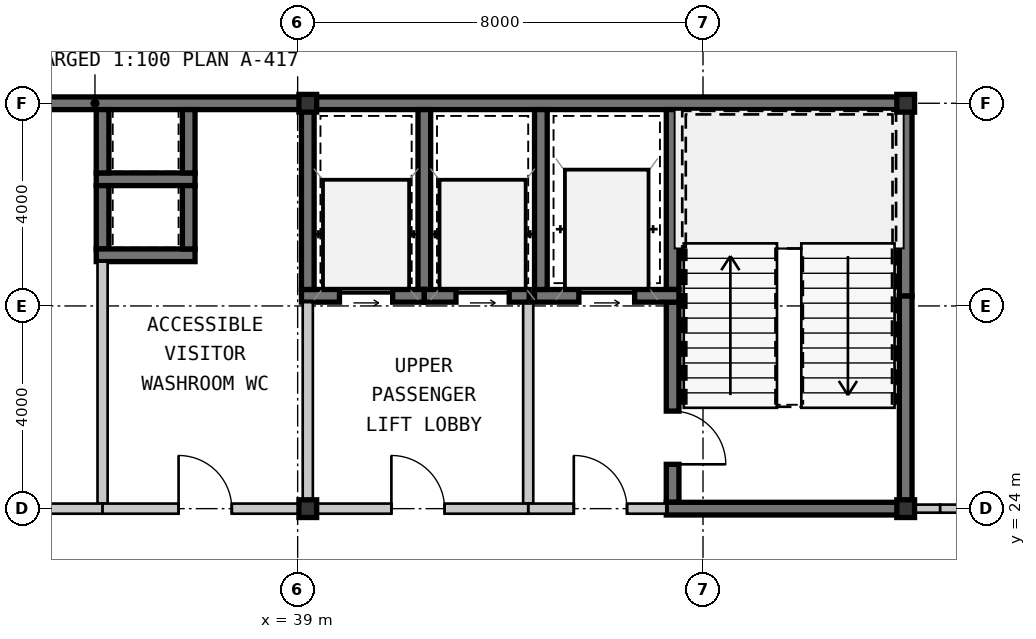
"""IFC4 building model, lengths in metres.
Left out: names, types, materials, properties, quantities, classifications, styles, units other than length and angle.
Written with IfcOpenShell. Run it as: python <this file> out.ifc"""

import sys

from ifc_helpers import new_model, si_unit, direction, frame, frame_2d, origin, origin_2d, place, context, subcontext, project, spatial, rectangle, hollow_rectangle, extrude, source, transform, mapped, element, fill, save


model = new_model("IFC4")
c1 = context("Model", 3, precision=1e-05, world=origin(), true_north=direction((0.0, 1.0)))
c2 = subcontext(c1, "Body", "Model", "MODEL_VIEW")
j1 = project(units=[si_unit("LENGTHUNIT", "METRE"), si_unit("PLANEANGLEUNIT", "RADIAN")], contexts=[c1])
p1 = place(None, origin())
s1 = spatial("IfcSite", under=j1, at=p1, CompositionType="ELEMENT")
p2 = place(p1, origin())
s2 = spatial("IfcBuilding", under=s1, at=p2, CompositionType="ELEMENT")
p3 = place(p2, frame((0.0, 0.0, 168.7)))
s3 = spatial("IfcBuildingStorey", under=s2, at=p3, CompositionType="ELEMENT", Elevation=168.7)
m1 = source(origin(), c2, "Body", "SweptSolid", [
    extrude(hollow_rectangle(XDim=0.35, YDim=0.35, WallThickness=0.016, at=origin_2d()), origin(), (0.0, 0.0, 1.0), 3.85),
])
for number, where, z_axis, x_axis in (
    (1, (39.2, 24.0, 0.0), (0.0, 0.0, 1.0), (1.0, 0.0, 0.0)),
    (2, (51.0, 24.0, 0.0), (0.0, 0.0, 1.0), (1.0, 0.0, 0.0)),
    (3, (39.2, 32.0, 0.0), (0.0, 0.0, 1.0), (1.0, 0.0, 0.0)),
    (4, (51.0, 32.0, 0.0), (0.0, 0.0, 1.0), (1.0, 0.0, 0.0)),
):
    element("IfcColumn", number, at=place(p3, frame(where, z_axis=z_axis, x_axis=x_axis)), inside=s3, PredefinedType="COLUMN", context=c2, shape_type="MappedRepresentation", body=[
        mapped(m1, transform((0.0, 0.0, 0.0), scale=1.0)),
    ])
m2 = source(origin(), c2, "Body", "SweptSolid", [
    extrude(rectangle(XDim=11.2, YDim=0.25, at=frame_2d((5.6, 0.0))), origin(), (0.0, 0.0, 1.0), 3.63),
])
p4 = place(p3, frame((28.0, 32.0, 0.0), z_axis=(0.0, 0.0, 1.0), x_axis=(1.0, 0.0, 0.0)))
e5 = element("IfcWall", 5, at=p4, inside=s3, PredefinedType="SHEAR", context=c2, shape_type="MappedRepresentation", body=[
    mapped(m2, transform((0.0, 0.0, 0.0), scale=1.0)),
])
m3 = source(origin(), c2, "Body", "SweptSolid", [
    extrude(rectangle(XDim=11.925, YDim=0.25, at=frame_2d((5.962, 0.0))), origin(), (0.0, 0.0, 1.0), 3.63),
])
p5 = place(p3, frame((39.2, 32.0, 0.0), z_axis=(0.0, 0.0, 1.0), x_axis=(1.0, 0.0, 0.0)))
e6 = element("IfcWall", 6, at=p5, inside=s3, PredefinedType="SHEAR", context=c2, shape_type="MappedRepresentation", body=[
    mapped(m3, transform((0.0, 0.0, 0.0), scale=1.0)),
])
m4 = source(origin(), c2, "Body", "SweptSolid", [
    extrude(rectangle(XDim=4.075, YDim=0.25, at=frame_2d((2.038, 0.0))), origin(), (0.0, 0.0, 1.0), 3.63),
])
p6 = place(p3, frame((51.0, 24.125, 0.0), z_axis=(0.0, 0.0, 1.0), x_axis=(0.0, 1.0, 0.0)))
e7 = element("IfcWall", 7, at=p6, inside=s3, PredefinedType="SHEAR", context=c2, shape_type="MappedRepresentation", body=[
    mapped(m4, transform((0.0, 0.0, 0.0), scale=1.0)),
])
m5 = source(origin(), c2, "Body", "SweptSolid", [
    extrude(rectangle(XDim=3.675, YDim=0.25, at=frame_2d((1.837, 0.0))), origin(), (0.0, 0.0, 1.0), 3.63),
])
p7 = place(p3, frame((51.0, 28.2, 0.0), z_axis=(0.0, 0.0, 1.0), x_axis=(0.0, 1.0, 0.0)))
e8 = element("IfcWall", 8, at=p7, inside=s3, PredefinedType="SHEAR", context=c2, shape_type="MappedRepresentation", body=[
    mapped(m5, transform((0.0, 0.0, 0.0), scale=1.0)),
])
m6 = source(origin(), c2, "Body", "SweptSolid", [
    extrude(rectangle(XDim=3.55, YDim=0.25, at=frame_2d((1.775, 0.0))), origin(), (0.0, 0.0, 1.0), 3.63),
])
p8 = place(p3, frame((46.4, 31.875, 0.0), z_axis=(0.0, 0.0, 1.0), x_axis=(0.0, -1.0, 0.0)))
e9 = element("IfcWall", 9, at=p8, inside=s3, PredefinedType="SHEAR", context=c2, shape_type="MappedRepresentation", body=[
    mapped(m6, transform((0.0, 0.0, 0.0), scale=1.0)),
])
m7 = source(origin(), c2, "Body", "SweptSolid", [
    extrude(rectangle(XDim=3.95, YDim=0.25, at=frame_2d((1.975, 0.0))), origin(), (0.0, 0.0, 1.0), 3.63),
])
p9 = place(p3, frame((46.4, 28.075, 0.0), z_axis=(0.0, 0.0, 1.0), x_axis=(0.0, -1.0, 0.0)))
e10 = element("IfcWall", 10, at=p9, inside=s3, PredefinedType="SHEAR", context=c2, shape_type="MappedRepresentation", body=[
    mapped(m7, transform((0.0, 0.0, 0.0), scale=1.0)),
])
m8 = source(origin(), c2, "Body", "SweptSolid", [
    extrude(rectangle(XDim=1.05, YDim=2.1, at=frame_2d((0.525, 1.05))), frame((0.0, 0.135, 0.0), z_axis=(0.0, -1.0, 0.0), x_axis=(1.0, 0.0, 0.0)), (0.0, 0.0, 1.0), 0.27),
])
p10 = place(p9, frame((2.15, 0.0, 0.0)))
e11 = element("IfcOpeningElement", 11, at=p10, cuts=e10, PredefinedType="OPENING", context=c2, shape_type="MappedRepresentation", body=[
    mapped(m8, transform((0.0, 0.0, 0.0), scale=1.0)),
])
m9 = source(origin(), c2, "Body", "SweptSolid", [
    extrude(rectangle(XDim=4.85, YDim=0.25, at=frame_2d((2.425, 0.0))), origin(), (0.0, 0.0, 1.0), 3.63),
])
p11 = place(p3, frame((46.275, 24.0, 0.0), z_axis=(0.0, 0.0, 1.0), x_axis=(1.0, 0.0, 0.0)))
e12 = element("IfcWall", 12, at=p11, inside=s3, PredefinedType="SHEAR", context=c2, shape_type="MappedRepresentation", body=[
    mapped(m9, transform((0.0, 0.0, 0.0), scale=1.0)),
])
m10 = source(origin(), c2, "Body", "SweptSolid", [
    extrude(rectangle(XDim=2.85, YDim=0.25, at=frame_2d((1.425, 0.0))), origin(), (0.0, 0.0, 1.0), 3.63),
])
p12 = place(p3, frame((43.675, 28.2, 0.0), z_axis=(0.0, 0.0, 1.0), x_axis=(1.0, 0.0, 0.0)))
e13 = element("IfcWall", 13, at=p12, inside=s3, PredefinedType="SHEAR", context=c2, shape_type="MappedRepresentation", body=[
    mapped(m10, transform((0.0, 0.0, 0.0), scale=1.0)),
])
m11 = source(origin(), c2, "Body", "SweptSolid", [
    extrude(rectangle(XDim=1.1, YDim=2.15, at=frame_2d((0.55, 1.075))), frame((0.0, 0.135, 0.0), z_axis=(0.0, -1.0, 0.0), x_axis=(1.0, 0.0, 0.0)), (0.0, 0.0, 1.0), 0.27),
])
p13 = place(p12, frame((0.875, 0.0, 0.0)))
e14 = element("IfcOpeningElement", 14, at=p13, cuts=e13, PredefinedType="OPENING", context=c2, shape_type="MappedRepresentation", body=[
    mapped(m11, transform((0.0, 0.0, 0.0), scale=1.0)),
])
p14 = place(p3, frame((43.8, 31.875, 0.0), z_axis=(0.0, 0.0, 1.0), x_axis=(0.0, -1.0, 0.0)))
e15 = element("IfcWall", 15, at=p14, inside=s3, PredefinedType="SHEAR", context=c2, shape_type="MappedRepresentation", body=[
    mapped(m6, transform((0.0, 0.0, 0.0), scale=1.0)),
])
m12 = source(origin(), c2, "Body", "SweptSolid", [
    extrude(rectangle(XDim=3.975, YDim=0.2, at=frame_2d((1.987, 0.0))), origin(), (0.0, 0.0, 1.0), 3.63),
])
p15 = place(p3, frame((43.55, 28.075, 0.0), z_axis=(0.0, 0.0, 1.0), x_axis=(0.0, -1.0, 0.0)))
e16 = element("IfcWall", 16, at=p15, inside=s3, PredefinedType="SOLIDWALL", context=c2, shape_type="MappedRepresentation", body=[
    mapped(m12, transform((0.0, 0.0, 0.0), scale=1.0)),
])
m13 = source(origin(), c2, "Body", "SweptSolid", [
    extrude(rectangle(XDim=2.725, YDim=0.2, at=frame_2d((1.362, 0.0))), origin(), (0.0, 0.0, 1.0), 3.097),
])
p16 = place(p3, frame((43.55, 24.0, 0.0), z_axis=(0.0, 0.0, 1.0), x_axis=(1.0, 0.0, 0.0)))
e17 = element("IfcWall", 17, at=p16, inside=s3, PredefinedType="SOLIDWALL", context=c2, shape_type="MappedRepresentation", body=[
    mapped(m13, transform((0.0, 0.0, 0.0), scale=1.0)),
])
m14 = source(origin(), c2, "Body", "SweptSolid", [
    extrude(rectangle(XDim=1.05, YDim=2.1, at=frame_2d((0.525, 1.05))), frame((0.0, 0.11, 0.0), z_axis=(0.0, -1.0, 0.0), x_axis=(1.0, 0.0, 0.0)), (0.0, 0.0, 1.0), 0.22),
])
p17 = place(p16, frame((0.9, 0.0, 0.0)))
e18 = element("IfcOpeningElement", 18, at=p17, cuts=e17, PredefinedType="OPENING", context=c2, shape_type="MappedRepresentation", body=[
    mapped(m14, transform((0.0, 0.0, 0.0), scale=1.0)),
])
m15 = source(origin(), c2, "Body", "SweptSolid", [
    extrude(rectangle(XDim=1.95, YDim=0.25, at=frame_2d((0.975, 0.0))), origin(), (0.0, 0.0, 1.0), 3.63),
])
p18 = place(p3, frame((35.025, 30.5, 0.0), z_axis=(0.0, 0.0, 1.0), x_axis=(1.0, 0.0, 0.0)))
e19 = element("IfcWall", 19, at=p18, inside=s3, PredefinedType="SHEAR", context=c2, shape_type="MappedRepresentation", body=[
    mapped(m15, transform((0.0, 0.0, 0.0), scale=1.0)),
])
m16 = source(origin(), c2, "Body", "SweptSolid", [
    extrude(rectangle(XDim=1.25, YDim=0.25, at=frame_2d((0.625, 0.0))), origin(), (0.0, 0.0, 1.0), 3.63),
])
for number, where, z_axis, x_axis in (
    (20, (35.15, 31.875, 0.0), (0.0, 0.0, 1.0), (0.0, -1.0, 0.0)),
    (21, (36.85, 30.625, 0.0), (0.0, 0.0, 1.0), (0.0, 1.0, 0.0)),
    (22, (35.15, 30.375, 0.0), (0.0, 0.0, 1.0), (0.0, -1.0, 0.0)),
):
    element("IfcWall", number, at=place(p3, frame(where, z_axis=z_axis, x_axis=x_axis)), inside=s3, PredefinedType="SHEAR", context=c2, shape_type="MappedRepresentation", body=[
        mapped(m16, transform((0.0, 0.0, 0.0), scale=1.0)),
    ])
p19 = place(p3, frame((35.025, 29.0, 0.0), z_axis=(0.0, 0.0, 1.0), x_axis=(1.0, 0.0, 0.0)))
e23 = element("IfcWall", 23, at=p19, inside=s3, PredefinedType="SHEAR", context=c2, shape_type="MappedRepresentation", body=[
    mapped(m15, transform((0.0, 0.0, 0.0), scale=1.0)),
])
p20 = place(p3, frame((36.85, 29.125, 0.0), z_axis=(0.0, 0.0, 1.0), x_axis=(0.0, 1.0, 0.0)))
e24 = element("IfcWall", 24, at=p20, inside=s3, PredefinedType="SHEAR", context=c2, shape_type="MappedRepresentation", body=[
    mapped(m16, transform((0.0, 0.0, 0.0), scale=1.0)),
])
p21 = place(p3, frame((41.5, 28.325, 0.0), z_axis=(0.0, 0.0, 1.0), x_axis=(0.0, 1.0, 0.0)))
e25 = element("IfcWall", 25, at=p21, inside=s3, PredefinedType="SHEAR", context=c2, shape_type="MappedRepresentation", body=[
    mapped(m6, transform((0.0, 0.0, 0.0), scale=1.0)),
])
m17 = source(origin(), c2, "Body", "SweptSolid", [
    extrude(rectangle(XDim=2.425, YDim=0.25, at=frame_2d((1.212, 0.0))), origin(), (0.0, 0.0, 1.0), 3.63),
])
p22 = place(p3, frame((39.075, 28.2, 0.0), z_axis=(0.0, 0.0, 1.0), x_axis=(1.0, 0.0, 0.0)))
e26 = element("IfcWall", 26, at=p22, inside=s3, PredefinedType="SHEAR", context=c2, shape_type="MappedRepresentation", body=[
    mapped(m17, transform((0.0, 0.0, 0.0), scale=1.0)),
])
m18 = source(origin(), c2, "Body", "SweptSolid", [
    extrude(rectangle(XDim=1.05, YDim=2.15, at=frame_2d((0.525, 1.075))), frame((0.0, 0.135, 0.0), z_axis=(0.0, -1.0, 0.0), x_axis=(1.0, 0.0, 0.0)), (0.0, 0.0, 1.0), 0.27),
])
p23 = place(p22, frame((0.75, 0.0, 0.0)))
e27 = element("IfcOpeningElement", 27, at=p23, cuts=e26, PredefinedType="OPENING", context=c2, shape_type="MappedRepresentation", body=[
    mapped(m18, transform((0.0, 0.0, 0.0), scale=1.0)),
])
p24 = place(p3, frame((39.2, 31.875, 0.0), z_axis=(0.0, 0.0, 1.0), x_axis=(0.0, -1.0, 0.0)))
e28 = element("IfcWall", 28, at=p24, inside=s3, PredefinedType="SHEAR", context=c2, shape_type="MappedRepresentation", body=[
    mapped(m6, transform((0.0, 0.0, 0.0), scale=1.0)),
])
m19 = source(origin(), c2, "Body", "SweptSolid", [
    extrude(rectangle(XDim=2.07, YDim=0.25, at=frame_2d((1.035, 0.0))), origin(), (0.0, 0.0, 1.0), 3.63),
])
p25 = place(p3, frame((41.5, 28.2, 0.0), z_axis=(0.0, 0.0, 1.0), x_axis=(1.0, 0.0, 0.0)))
e29 = element("IfcWall", 29, at=p25, inside=s3, PredefinedType="SHEAR", context=c2, shape_type="MappedRepresentation", body=[
    mapped(m19, transform((0.0, 0.0, 0.0), scale=1.0)),
])
p26 = place(p25, frame((0.625, 0.0, 0.0)))
e30 = element("IfcOpeningElement", 30, at=p26, cuts=e29, PredefinedType="OPENING", context=c2, shape_type="MappedRepresentation", body=[
    mapped(m18, transform((0.0, 0.0, 0.0), scale=1.0)),
])
m20 = source(origin(), c2, "Body", "SweptSolid", [
    extrude(rectangle(XDim=3.975, YDim=0.2, at=frame_2d((1.987, 0.0))), origin(), (0.0, 0.0, 1.0), 3.17),
])
p27 = place(p3, frame((39.2, 24.1, 0.0), z_axis=(0.0, 0.0, 1.0), x_axis=(0.0, 1.0, 0.0)))
e31 = element("IfcWall", 31, at=p27, inside=s3, PredefinedType="SOLIDWALL", context=c2, shape_type="MappedRepresentation", body=[
    mapped(m20, transform((0.0, 0.0, 0.0), scale=1.0)),
])
m21 = source(origin(), c2, "Body", "SweptSolid", [
    extrude(rectangle(XDim=4.35, YDim=0.2, at=frame_2d((2.175, 0.0))), origin(), (0.0, 0.0, 1.0), 3.097),
])
p28 = place(p3, frame((43.55, 24.0, 0.0), z_axis=(0.0, 0.0, 1.0), x_axis=(-1.0, 0.0, 0.0)))
e32 = element("IfcWall", 32, at=p28, inside=s3, PredefinedType="SOLIDWALL", context=c2, shape_type="MappedRepresentation", body=[
    mapped(m21, transform((0.0, 0.0, 0.0), scale=1.0)),
])
p29 = place(p28, frame((1.65, 0.0, 0.0)))
e33 = element("IfcOpeningElement", 33, at=p29, cuts=e32, PredefinedType="OPENING", context=c2, shape_type="MappedRepresentation", body=[
    mapped(m14, transform((0.0, 0.0, 0.0), scale=1.0)),
])
m22 = source(origin(), c2, "Body", "SweptSolid", [
    extrude(rectangle(XDim=4.775, YDim=0.2, at=frame_2d((2.387, 0.0))), origin(), (0.0, 0.0, 1.0), 3.63),
])
p30 = place(p3, frame((35.15, 28.875, 0.0), z_axis=(0.0, 0.0, 1.0), x_axis=(0.0, -1.0, 0.0)))
e34 = element("IfcWall", 34, at=p30, inside=s3, PredefinedType="SOLIDWALL", context=c2, shape_type="MappedRepresentation", body=[
    mapped(m22, transform((0.0, 0.0, 0.0), scale=1.0)),
])
m23 = source(origin(), c2, "Body", "SweptSolid", [
    extrude(rectangle(XDim=8.7, YDim=0.2, at=frame_2d((4.35, 0.0))), origin(), (0.0, 0.0, 1.0), 3.17),
])
p31 = place(p3, frame((35.15, 24.0, 0.0), z_axis=(0.0, 0.0, 1.0), x_axis=(-1.0, 0.0, 0.0)))
e35 = element("IfcWall", 35, at=p31, inside=s3, PredefinedType="SOLIDWALL", context=c2, shape_type="MappedRepresentation", body=[
    mapped(m23, transform((0.0, 0.0, 0.0), scale=1.0)),
])
p32 = place(p31, frame((3.825, 0.0, 0.0)))
e36 = element("IfcOpeningElement", 36, at=p32, cuts=e35, PredefinedType="OPENING", context=c2, shape_type="MappedRepresentation", body=[
    mapped(m14, transform((0.0, 0.0, 0.0), scale=1.0)),
])
m24 = source(origin(), c2, "Body", "SweptSolid", [
    extrude(rectangle(XDim=4.05, YDim=0.2, at=frame_2d((2.025, 0.0))), origin(), (0.0, 0.0, 1.0), 3.17),
])
p33 = place(p3, frame((39.2, 24.0, 0.0), z_axis=(0.0, 0.0, 1.0), x_axis=(-1.0, 0.0, 0.0)))
e37 = element("IfcWall", 37, at=p33, inside=s3, PredefinedType="SOLIDWALL", context=c2, shape_type="MappedRepresentation", body=[
    mapped(m24, transform((0.0, 0.0, 0.0), scale=1.0)),
])
p34 = place(p33, frame((1.5, 0.0, 0.0)))
e38 = element("IfcOpeningElement", 38, at=p34, cuts=e37, PredefinedType="OPENING", context=c2, shape_type="MappedRepresentation", body=[
    mapped(m14, transform((0.0, 0.0, 0.0), scale=1.0)),
])
m25 = source(origin(), c2, "Body", "SweptSolid", [
    extrude(rectangle(XDim=0.556, YDim=0.16, at=frame_2d((0.278, 0.0))), origin(), (0.0, 0.0, 1.0), 3.17),
])
p35 = place(p3, frame((51.125, 24.0, 0.0), z_axis=(0.0, 0.0, 1.0), x_axis=(1.0, 0.0, 0.0)))
e39 = element("IfcWall", 39, at=p35, inside=s3, PredefinedType="PARTITIONING", context=c2, shape_type="MappedRepresentation", body=[
    mapped(m25, transform((0.0, 0.0, 0.0), scale=1.0)),
])
m26 = source(origin(), c2, "Body", "SweptSolid", [
    extrude(rectangle(XDim=9.153, YDim=0.16, at=frame_2d((4.576, 0.0))), origin(), (0.0, 0.0, 1.0), 3.63),
])
p36 = place(p3, frame((51.681, 24.0, 0.0), z_axis=(0.0, 0.0, 1.0), x_axis=(1.0, 0.0, 0.0)))
e40 = element("IfcWall", 40, at=p36, inside=s3, PredefinedType="PARTITIONING", context=c2, shape_type="MappedRepresentation", body=[
    mapped(m26, transform((0.0, 0.0, 0.0), scale=1.0)),
])
m27 = source(origin(), c2, "Body", "SweptSolid", [
    extrude(rectangle(XDim=0.92, YDim=2.1, at=frame_2d((0.46, 1.05))), frame((0.0, 0.09, 0.0), z_axis=(0.0, -1.0, 0.0), x_axis=(1.0, 0.0, 0.0)), (0.0, 0.0, 1.0), 0.18),
])
p37 = place(p36, frame((3.786, 0.0, 0.0)))
e41 = element("IfcOpeningElement", 41, at=p37, cuts=e40, PredefinedType="OPENING", context=c2, shape_type="MappedRepresentation", body=[
    mapped(m27, transform((0.0, 0.0, 0.0), scale=1.0)),
])
m28 = source(origin(), c2, "Body", "SweptSolid", [
    extrude(rectangle(XDim=1.05, YDim=2.1, at=frame_2d((0.525, 1.05))), frame((0.0, 0.025, 0.0), z_axis=(0.0, -1.0, 0.0), x_axis=(1.0, 0.0, 0.0)), (0.0, 0.0, 1.0), 0.05),
])
p38 = place(p10, origin())
e42 = element("IfcDoor", 42, at=p38, inside=s3, OperationType="SINGLE_SWING_RIGHT", PredefinedType="DOOR", context=c2, shape_type="MappedRepresentation", body=[
    mapped(m28, transform((0.0, 0.0, 0.0), scale=1.0)),
])
fill(e11, e42)
m29 = source(origin(), c2, "Body", "SweptSolid", [
    extrude(rectangle(XDim=1.1, YDim=2.15, at=frame_2d((0.55, 1.075))), frame((0.0, 0.025, 0.0), z_axis=(0.0, -1.0, 0.0), x_axis=(1.0, 0.0, 0.0)), (0.0, 0.0, 1.0), 0.05),
])
p39 = place(p13, origin())
e43 = element("IfcDoor", 43, at=p39, inside=s3, OperationType="SLIDING_TO_LEFT", PredefinedType="DOOR", context=c2, shape_type="MappedRepresentation", body=[
    mapped(m29, transform((0.0, 0.0, 0.0), scale=1.0)),
])
fill(e14, e43)
p40 = place(p17, origin())
e44 = element("IfcDoor", 44, at=p40, inside=s3, OperationType="SINGLE_SWING_LEFT", PredefinedType="DOOR", context=c2, shape_type="MappedRepresentation", body=[
    mapped(m28, transform((0.0, 0.0, 0.0), scale=1.0)),
])
fill(e18, e44)
m30 = source(origin(), c2, "Body", "SweptSolid", [
    extrude(rectangle(XDim=1.05, YDim=2.15, at=frame_2d((0.525, 1.075))), frame((0.0, 0.025, 0.0), z_axis=(0.0, -1.0, 0.0), x_axis=(1.0, 0.0, 0.0)), (0.0, 0.0, 1.0), 0.05),
])
p41 = place(p23, origin())
e45 = element("IfcDoor", 45, at=p41, inside=s3, OperationType="SLIDING_TO_LEFT", PredefinedType="DOOR", context=c2, shape_type="MappedRepresentation", body=[
    mapped(m30, transform((0.0, 0.0, 0.0), scale=1.0)),
])
fill(e27, e45)
p42 = place(p26, origin())
e46 = element("IfcDoor", 46, at=p42, inside=s3, OperationType="SLIDING_TO_LEFT", PredefinedType="DOOR", context=c2, shape_type="MappedRepresentation", body=[
    mapped(m30, transform((0.0, 0.0, 0.0), scale=1.0)),
])
fill(e30, e46)
p43 = place(p29, frame((1.05, 0.0, 0.0), z_axis=(0.0, 0.0, 1.0), x_axis=(-1.0, 0.0, 0.0)))
e47 = element("IfcDoor", 47, at=p43, inside=s3, OperationType="SINGLE_SWING_LEFT", PredefinedType="DOOR", context=c2, shape_type="MappedRepresentation", body=[
    mapped(m28, transform((0.0, 0.0, 0.0), scale=1.0)),
])
fill(e33, e47)
p44 = place(p34, frame((1.05, 0.0, 0.0), z_axis=(0.0, 0.0, 1.0), x_axis=(-1.0, 0.0, 0.0)))
e48 = element("IfcDoor", 48, at=p44, inside=s3, OperationType="SINGLE_SWING_LEFT", PredefinedType="DOOR", context=c2, shape_type="MappedRepresentation", body=[
    mapped(m28, transform((0.0, 0.0, 0.0), scale=1.0)),
])
fill(e38, e48)
save(model, sys.argv[1])
